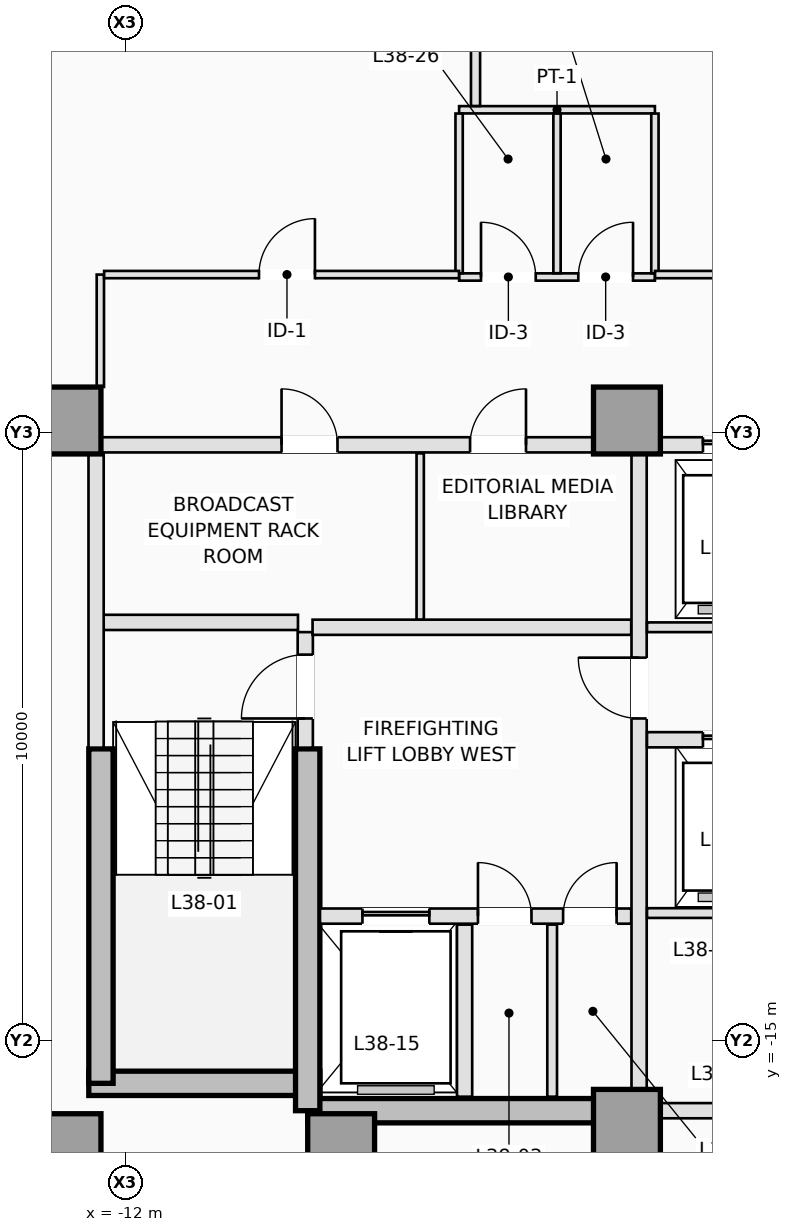
"""IFC4 building model, lengths in metres.
Left out: names, types, materials, properties, quantities, classifications, styles, units other than length and angle.
Written with IfcOpenShell. Run it as: python <this file> out.ifc"""

import sys

from ifc_helpers import new_model, si_unit, direction, frame, frame_2d, origin, origin_2d, place, context, subcontext, project, spatial, rectangle, extrude, element, fill, save


model = new_model("IFC4")
c1 = context("Model", 3, precision=1e-05, world=origin(), true_north=direction((0.0, 1.0)))
c2 = subcontext(c1, "Body", "Model", "MODEL_VIEW")
j1 = project(units=[si_unit("LENGTHUNIT", "METRE"), si_unit("PLANEANGLEUNIT", "RADIAN")], contexts=[c1])
p1 = place(None, origin())
s1 = spatial("IfcSite", under=j1, at=p1, CompositionType="ELEMENT")
p2 = place(p1, origin())
s2 = spatial("IfcBuilding", under=s1, at=p2, CompositionType="ELEMENT")
p3 = place(p2, frame((0.0, 0.0, 140.5)))
s3 = spatial("IfcBuildingStorey", under=s2, at=p3, CompositionType="ELEMENT", Elevation=140.5)
p4 = place(p3, frame((-12.6, -15.7, 0.0), z_axis=(0.0, 0.0, 1.0), x_axis=(1.0, 0.0, 0.0)))
e1 = element("IfcWall", 1, at=p4, inside=s3, PredefinedType="SHEAR", context=c2, shape_type="SweptSolid", body=[
    extrude(rectangle(XDim=3.8, YDim=0.4, at=frame_2d((1.9, 0.0))), origin(), (0.0, 0.0, 1.0), 3.5),
])
p5 = place(p3, frame((-9.0, -16.15, 0.0), z_axis=(0.0, 0.0, 1.0), x_axis=(1.0, 0.0, 0.0)))
e2 = element("IfcWall", 2, at=p5, inside=s3, PredefinedType="SHEAR", context=c2, shape_type="SweptSolid", body=[
    extrude(rectangle(XDim=5.25, YDim=0.4, at=frame_2d((2.625, 0.0))), origin(), (0.0, 0.0, 1.0), 3.5),
])
p6 = place(p3, frame((-12.4, -15.7, 0.0), z_axis=(0.0, 0.0, 1.0), x_axis=(0.0, 1.0, 0.0)))
e3 = element("IfcWall", 3, at=p6, inside=s3, PredefinedType="SHEAR", context=c2, shape_type="SweptSolid", body=[
    extrude(rectangle(XDim=5.5, YDim=0.4, at=frame_2d((2.75, 0.0))), origin(), (0.0, 0.0, 1.0), 3.5),
])
p7 = place(p3, frame((-9.0, -16.15, 0.0), z_axis=(0.0, 0.0, 1.0), x_axis=(0.0, 1.0, 0.0)))
e4 = element("IfcWall", 4, at=p7, inside=s3, PredefinedType="SHEAR", context=c2, shape_type="SweptSolid", body=[
    extrude(rectangle(XDim=5.95, YDim=0.4, at=frame_2d((2.975, 0.0))), origin(), (0.0, 0.0, 1.0), 3.5),
])
for number, where, z_axis, x_axis in (
    (5, (-12.95, -16.75, 0.0), (0.0, 0.0, 1.0), (1.0, 0.0, 0.0)),
    (6, (-8.45, -16.75, 0.0), (0.0, 0.0, 1.0), (1.0, 0.0, 0.0)),
    (7, (-3.75, -16.35, 0.0), (0.0, 0.0, 1.0), (1.0, 0.0, 0.0)),
    (8, (-12.95, -4.8, 0.0), (0.0, 0.0, 1.0), (1.0, 0.0, 0.0)),
    (9, (-3.75, -4.8, 0.0), (0.0, 0.0, 1.0), (1.0, 0.0, 0.0)),
):
    element("IfcColumn", number, at=place(p3, frame(where, z_axis=z_axis, x_axis=x_axis)), inside=s3, PredefinedType="COLUMN", context=c2, shape_type="SweptSolid", body=[
        extrude(rectangle(XDim=1.1, YDim=1.1, at=origin_2d()), origin(), (0.0, 0.0, 1.0), 3.5),
    ])
p8 = place(p3, frame((-15.383, -0.305, 0.0), z_axis=(0.0, 0.0, 1.0), x_axis=(0.490232095789, 0.871591929895, 0.0)))
e10 = element("IfcWall", 10, at=p8, inside=s3, PredefinedType="STANDARD", context=c2, shape_type="SweptSolid", body=[
    extrude(rectangle(XDim=4.375, YDim=0.28, at=frame_2d((2.188, 0.0))), origin(), (0.0, 0.0, 1.0), 3.25),
])
p9 = place(p3, frame((-9.04, -10.18, 0.0), z_axis=(0.0, 0.0, 1.0), x_axis=(0.0, 1.0, 0.0)))
e11 = element("IfcWall", 11, at=p9, inside=s3, PredefinedType="PARTITIONING", context=c2, shape_type="SweptSolid", body=[
    extrude(rectangle(XDim=1.9, YDim=0.25, at=frame_2d((0.95, 0.0))), origin(), (0.0, 0.0, 1.0), 3.25),
])
p10 = place(p9, frame((0.48, 0.0, 0.0)))
e12 = element("IfcOpeningElement", 12, at=p10, cuts=e11, PredefinedType="OPENING", context=c2, shape_type="SweptSolid", body=[
    extrude(rectangle(XDim=1.05, YDim=2.15, at=frame_2d((0.525, 1.075))), frame((0.0, 0.135, 0.0), z_axis=(0.0, -1.0, 0.0), x_axis=(1.0, 0.0, 0.0)), (0.0, 0.0, 1.0), 0.27),
])
p11 = place(p3, frame((-12.38, -8.12, 0.0), z_axis=(0.0, 0.0, 1.0), x_axis=(1.0, 0.0, 0.0)))
e13 = element("IfcWall", 13, at=p11, inside=s3, PredefinedType="PARTITIONING", context=c2, shape_type="SweptSolid", body=[
    extrude(rectangle(XDim=3.22, YDim=0.25, at=frame_2d((1.61, 0.0))), origin(), (0.0, 0.0, 1.0), 3.25),
])
p12 = place(p3, frame((-12.48, -10.18, 0.0), z_axis=(0.0, 0.0, 1.0), x_axis=(0.0, 1.0, 0.0)))
e14 = element("IfcWall", 14, at=p12, inside=s3, PredefinedType="PARTITIONING", context=c2, shape_type="SweptSolid", body=[
    extrude(rectangle(XDim=4.828, YDim=0.25, at=frame_2d((2.414, 0.0))), origin(), (0.0, 0.0, 1.0), 3.25),
])
p13 = place(p3, frame((-8.798, -12.95, 0.0), z_axis=(0.0, 0.0, 1.0), x_axis=(1.0, 0.0, 0.0)))
e15 = element("IfcWall", 15, at=p13, inside=s3, PredefinedType="PARTITIONING", context=c2, shape_type="SweptSolid", body=[
    extrude(rectangle(XDim=5.118, YDim=0.25, at=frame_2d((2.559, 0.0))), origin(), (0.0, 0.0, 1.0), 3.25),
])
p14 = place(p13, frame((0.698, 0.0, 0.0)))
e16 = element("IfcOpeningElement", 16, at=p14, cuts=e15, PredefinedType="OPENING", context=c2, shape_type="SweptSolid", body=[
    extrude(rectangle(XDim=1.1, YDim=2.15, at=frame_2d((0.55, 1.075))), frame((0.0, 0.135, 0.0), z_axis=(0.0, -1.0, 0.0), x_axis=(1.0, 0.0, 0.0)), (0.0, 0.0, 1.0), 0.27),
])
p15 = place(p13, frame((2.598, 0.0, 0.0)))
e17 = element("IfcOpeningElement", 17, at=p15, cuts=e15, PredefinedType="OPENING", context=c2, shape_type="SweptSolid", body=[
    extrude(rectangle(XDim=0.88, YDim=2.1, at=frame_2d((0.44, 1.05))), frame((0.0, 0.135, 0.0), z_axis=(0.0, -1.0, 0.0), x_axis=(1.0, 0.0, 0.0)), (0.0, 0.0, 1.0), 0.27),
])
p16 = place(p13, frame((3.998, 0.0, 0.0)))
e18 = element("IfcOpeningElement", 18, at=p16, cuts=e15, PredefinedType="OPENING", context=c2, shape_type="SweptSolid", body=[
    extrude(rectangle(XDim=0.88, YDim=2.1, at=frame_2d((0.44, 1.05))), frame((0.0, 0.135, 0.0), z_axis=(0.0, -1.0, 0.0), x_axis=(1.0, 0.0, 0.0)), (0.0, 0.0, 1.0), 0.27),
])
p17 = place(p3, frame((-6.42, -15.92, 0.0), z_axis=(0.0, 0.0, 1.0), x_axis=(0.0, 1.0, 0.0)))
e19 = element("IfcWall", 19, at=p17, inside=s3, PredefinedType="PARTITIONING", context=c2, shape_type="SweptSolid", body=[
    extrude(rectangle(XDim=2.83, YDim=0.25, at=frame_2d((1.415, 0.0))), origin(), (0.0, 0.0, 1.0), 3.25),
])
p18 = place(p3, frame((-4.98, -15.92, 0.0), z_axis=(0.0, 0.0, 1.0), x_axis=(0.0, 1.0, 0.0)))
e20 = element("IfcWall", 20, at=p18, inside=s3, PredefinedType="PARTITIONING", context=c2, shape_type="SweptSolid", body=[
    extrude(rectangle(XDim=2.83, YDim=0.16, at=frame_2d((1.415, 0.0))), origin(), (0.0, 0.0, 1.0), 3.25),
])
p19 = place(p3, frame((-8.92, -8.2, 0.0), z_axis=(0.0, 0.0, 1.0), x_axis=(1.0, 0.0, 0.0)))
e21 = element("IfcWall", 21, at=p19, inside=s3, PredefinedType="PARTITIONING", context=c2, shape_type="SweptSolid", body=[
    extrude(rectangle(XDim=5.24, YDim=0.25, at=frame_2d((2.62, 0.0))), origin(), (0.0, 0.0, 1.0), 3.25),
])
p20 = place(p3, frame((-3.55, -15.798, 0.0), z_axis=(0.0, 0.0, 1.0), x_axis=(0.0, 1.0, 0.0)))
e22 = element("IfcWall", 22, at=p20, inside=s3, PredefinedType="PARTITIONING", context=c2, shape_type="SweptSolid", body=[
    extrude(rectangle(XDim=10.446, YDim=0.25, at=frame_2d((5.223, 0.0))), origin(), (0.0, 0.0, 1.0), 3.25),
])
p21 = place(p20, frame((6.098, 0.0, 0.0)))
e23 = element("IfcOpeningElement", 23, at=p21, cuts=e22, PredefinedType="OPENING", context=c2, shape_type="SweptSolid", body=[
    extrude(rectangle(XDim=1.0, YDim=2.15, at=frame_2d((0.5, 1.075))), frame((0.0, 0.135, 0.0), z_axis=(0.0, -1.0, 0.0), x_axis=(1.0, 0.0, 0.0)), (0.0, 0.0, 1.0), 0.27),
])
p22 = place(p3, frame((-12.398, -5.2, 0.0), z_axis=(0.0, 0.0, 1.0), x_axis=(1.0, 0.0, 0.0)))
e24 = element("IfcWall", 24, at=p22, inside=s3, PredefinedType="PARTITIONING", context=c2, shape_type="SweptSolid", body=[
    extrude(rectangle(XDim=8.096, YDim=0.25, at=frame_2d((4.048, 0.0))), origin(), (0.0, 0.0, 1.0), 3.25),
])
p23 = place(p22, frame((2.968, 0.0, 0.0)))
e25 = element("IfcOpeningElement", 25, at=p23, cuts=e24, PredefinedType="OPENING", context=c2, shape_type="SweptSolid", body=[
    extrude(rectangle(XDim=0.92, YDim=2.12, at=frame_2d((0.46, 1.06))), frame((0.0, 0.135, 0.0), z_axis=(0.0, -1.0, 0.0), x_axis=(1.0, 0.0, 0.0)), (0.0, 0.0, 1.0), 0.27),
])
p24 = place(p22, frame((6.068, 0.0, 0.0)))
e26 = element("IfcOpeningElement", 26, at=p24, cuts=e24, PredefinedType="OPENING", context=c2, shape_type="SweptSolid", body=[
    extrude(rectangle(XDim=0.92, YDim=2.12, at=frame_2d((0.46, 1.06))), frame((0.0, 0.135, 0.0), z_axis=(0.0, -1.0, 0.0), x_axis=(1.0, 0.0, 0.0)), (0.0, 0.0, 1.0), 0.27),
])
p25 = place(p3, frame((-3.198, -5.2, 0.0), z_axis=(0.0, 0.0, 1.0), x_axis=(1.0, 0.0, 0.0)))
e27 = element("IfcWall", 27, at=p25, inside=s3, PredefinedType="PARTITIONING", context=c2, shape_type="SweptSolid", body=[
    extrude(rectangle(XDim=2.248, YDim=0.25, at=frame_2d((1.124, 0.0))), origin(), (0.0, 0.0, 1.0), 3.25),
])
p26 = place(p25, frame((0.698, 0.0, 0.0)))
e28 = element("IfcOpeningElement", 28, at=p26, cuts=e27, PredefinedType="OPENING", context=c2, shape_type="SweptSolid", body=[
    extrude(rectangle(XDim=1.0, YDim=2.15, at=frame_2d((0.5, 1.075))), frame((0.0, 0.135, 0.0), z_axis=(0.0, -1.0, 0.0), x_axis=(1.0, 0.0, 0.0)), (0.0, 0.0, 1.0), 0.27),
])
p27 = place(p3, frame((-7.15, -8.073, 0.0), z_axis=(0.0, 0.0, 1.0), x_axis=(0.0, 1.0, 0.0)))
e29 = element("IfcWall", 29, at=p27, inside=s3, PredefinedType="PARTITIONING", context=c2, shape_type="SweptSolid", body=[
    extrude(rectangle(XDim=2.733, YDim=0.12, at=frame_2d((1.366, 0.0))), origin(), (0.0, 0.0, 1.0), 3.25),
])
p28 = place(p3, frame((-3.198, -16.15, 0.0), z_axis=(0.0, 0.0, 1.0), x_axis=(1.0, 0.0, 0.0)))
e30 = element("IfcWall", 30, at=p28, inside=s3, PredefinedType="PARTITIONING", context=c2, shape_type="SweptSolid", body=[
    extrude(rectangle(XDim=6.396, YDim=0.25, at=frame_2d((3.198, 0.0))), origin(), (0.0, 0.0, 1.0), 2.45),
])
p29 = place(p3, frame((-3.42, -8.2, 0.0), z_axis=(0.0, 0.0, 1.0), x_axis=(1.0, 0.0, 0.0)))
e31 = element("IfcWall", 31, at=p29, inside=s3, PredefinedType="PARTITIONING", context=c2, shape_type="SweptSolid", body=[
    extrude(rectangle(XDim=2.47, YDim=0.16, at=frame_2d((1.235, 0.0))), origin(), (0.0, 0.0, 1.0), 3.25),
])
p30 = place(p3, frame((-3.42, -10.05, 0.0), z_axis=(0.0, 0.0, 1.0), x_axis=(1.0, 0.0, 0.0)))
e32 = element("IfcWall", 32, at=p30, inside=s3, PredefinedType="PARTITIONING", context=c2, shape_type="SweptSolid", body=[
    extrude(rectangle(XDim=2.47, YDim=0.25, at=frame_2d((1.235, 0.0))), origin(), (0.0, 0.0, 1.0), 3.25),
])
p31 = place(p30, frame((0.92, 0.0, 0.0)))
e33 = element("IfcOpeningElement", 33, at=p31, cuts=e32, PredefinedType="OPENING", context=c2, shape_type="SweptSolid", body=[
    extrude(rectangle(XDim=1.0, YDim=2.15, at=frame_2d((0.5, 1.075))), frame((0.0, 0.135, 0.0), z_axis=(0.0, -1.0, 0.0), x_axis=(1.0, 0.0, 0.0)), (0.0, 0.0, 1.0), 0.27),
])
p32 = place(p3, frame((-3.42, -12.9, 0.0), z_axis=(0.0, 0.0, 1.0), x_axis=(1.0, 0.0, 0.0)))
e34 = element("IfcWall", 34, at=p32, inside=s3, PredefinedType="PARTITIONING", context=c2, shape_type="SweptSolid", body=[
    extrude(rectangle(XDim=6.84, YDim=0.16, at=frame_2d((3.42, 0.0))), origin(), (0.0, 0.0, 1.0), 3.25),
])
p33 = place(p32, frame((2.98, 0.0, 0.0)))
e35 = element("IfcOpeningElement", 35, at=p33, cuts=e34, PredefinedType="OPENING", context=c2, shape_type="SweptSolid", body=[
    extrude(rectangle(XDim=0.88, YDim=2.12, at=frame_2d((0.44, 1.06))), frame((0.0, 0.09, 0.0), z_axis=(0.0, -1.0, 0.0), x_axis=(1.0, 0.0, 0.0)), (0.0, 0.0, 1.0), 0.18),
])
p34 = place(p3, frame((-6.51, -2.44, 0.0), z_axis=(0.0, 0.0, 1.0), x_axis=(1.0, 0.0, 0.0)))
e36 = element("IfcWall", 36, at=p34, inside=s3, PredefinedType="PARTITIONING", context=c2, shape_type="SweptSolid", body=[
    extrude(rectangle(XDim=3.22, YDim=0.12, at=frame_2d((1.61, 0.0))), origin(), (0.0, 0.0, 1.0), 2.891),
])
p35 = place(p34, frame((0.36, 0.0, 0.0)))
e37 = element("IfcOpeningElement", 37, at=p35, cuts=e36, PredefinedType="OPENING", context=c2, shape_type="SweptSolid", body=[
    extrude(rectangle(XDim=0.9, YDim=2.12, at=frame_2d((0.45, 1.06))), frame((0.0, 0.07, 0.0), z_axis=(0.0, -1.0, 0.0), x_axis=(1.0, 0.0, 0.0)), (0.0, 0.0, 1.0), 0.14),
])
p36 = place(p34, frame((1.96, 0.0, 0.0)))
e38 = element("IfcOpeningElement", 38, at=p36, cuts=e36, PredefinedType="OPENING", context=c2, shape_type="SweptSolid", body=[
    extrude(rectangle(XDim=0.9, YDim=2.12, at=frame_2d((0.45, 1.06))), frame((0.0, 0.07, 0.0), z_axis=(0.0, -1.0, 0.0), x_axis=(1.0, 0.0, 0.0)), (0.0, 0.0, 1.0), 0.14),
])
p37 = place(p3, frame((-6.51, 0.31, 0.0), z_axis=(0.0, 0.0, 1.0), x_axis=(1.0, 0.0, 0.0)))
e39 = element("IfcWall", 39, at=p37, inside=s3, PredefinedType="PARTITIONING", context=c2, shape_type="SweptSolid", body=[
    extrude(rectangle(XDim=3.22, YDim=0.12, at=frame_2d((1.61, 0.0))), origin(), (0.0, 0.0, 1.0), 3.25),
])
for number, where, z_axis, x_axis in (
    (40, (-6.51, -2.378, 0.0), (0.0, 0.0, 1.0), (0.0, 1.0, 0.0)),
    (41, (-4.9, -2.378, 0.0), (0.0, 0.0, 1.0), (0.0, 1.0, 0.0)),
    (42, (-3.29, -2.378, 0.0), (0.0, 0.0, 1.0), (0.0, 1.0, 0.0)),
):
    element("IfcWall", number, at=place(p3, frame(where, z_axis=z_axis, x_axis=x_axis)), inside=s3, PredefinedType="PARTITIONING", context=c2, shape_type="SweptSolid", body=[
        extrude(rectangle(XDim=2.626, YDim=0.12, at=frame_2d((1.313, 0.0))), origin(), (0.0, 0.0, 1.0), 3.25),
    ])
p38 = place(p3, frame((-12.41, -4.248, 0.0), z_axis=(0.0, 0.0, 1.0), x_axis=(0.0, 1.0, 0.0)))
e43 = element("IfcWall", 43, at=p38, inside=s3, PredefinedType="PARTITIONING", context=c2, shape_type="SweptSolid", body=[
    extrude(rectangle(XDim=1.848, YDim=0.12, at=frame_2d((0.924, 0.0))), origin(), (0.0, 0.0, 1.0), 3.25),
])
p39 = place(p3, frame((-12.348, -2.4, 0.0), z_axis=(0.0, 0.0, 1.0), x_axis=(1.0, 0.0, 0.0)))
e44 = element("IfcWall", 44, at=p39, inside=s3, PredefinedType="PARTITIONING", context=c2, shape_type="SweptSolid", body=[
    extrude(rectangle(XDim=5.836, YDim=0.12, at=frame_2d((2.918, 0.0))), origin(), (0.0, 0.0, 1.0), 3.25),
])
p40 = place(p39, frame((2.547, 0.0, 0.0)))
e45 = element("IfcOpeningElement", 45, at=p40, cuts=e44, PredefinedType="OPENING", context=c2, shape_type="SweptSolid", body=[
    extrude(rectangle(XDim=0.92, YDim=2.12, at=frame_2d((0.46, 1.06))), frame((0.0, 0.07, 0.0), z_axis=(0.0, -1.0, 0.0), x_axis=(1.0, 0.0, 0.0)), (0.0, 0.0, 1.0), 0.14),
])
p41 = place(p3, frame((-3.288, -2.4, 0.0), z_axis=(0.0, 0.0, 1.0), x_axis=(1.0, 0.0, 0.0)))
e46 = element("IfcWall", 46, at=p41, inside=s3, PredefinedType="PARTITIONING", context=c2, shape_type="SweptSolid", body=[
    extrude(rectangle(XDim=2.218, YDim=0.12, at=frame_2d((1.109, 0.0))), origin(), (0.0, 0.0, 1.0), 2.891),
])
p42 = place(p3, frame((-6.24, 0.372, 0.0), z_axis=(0.0, 0.0, 1.0), x_axis=(0.0, 1.0, 0.0)))
e47 = element("IfcWall", 47, at=p42, inside=s3, PredefinedType="PARTITIONING", context=c2, shape_type="SweptSolid", body=[
    extrude(rectangle(XDim=1.795, YDim=0.15, at=frame_2d((0.898, 0.0))), origin(), (0.0, 0.0, 1.0), 3.25),
])
p43 = place(p26, origin())
e48 = element("IfcDoor", 48, at=p43, inside=s3, OperationType="SLIDING_TO_LEFT", PredefinedType="DOOR", context=c2, shape_type="SweptSolid", body=[
    extrude(rectangle(XDim=1.0, YDim=2.15, at=frame_2d((0.5, 1.075))), frame((0.0, 0.025, 0.0), z_axis=(0.0, -1.0, 0.0), x_axis=(1.0, 0.0, 0.0)), (0.0, 0.0, 1.0), 0.05),
])
fill(e28, e48)
p44 = place(p14, origin())
e49 = element("IfcDoor", 49, at=p44, inside=s3, OperationType="SLIDING_TO_LEFT", PredefinedType="DOOR", context=c2, shape_type="SweptSolid", body=[
    extrude(rectangle(XDim=1.1, YDim=2.15, at=frame_2d((0.55, 1.075))), frame((0.0, 0.025, 0.0), z_axis=(0.0, -1.0, 0.0), x_axis=(1.0, 0.0, 0.0)), (0.0, 0.0, 1.0), 0.05),
])
fill(e16, e49)
p45 = place(p31, origin())
e50 = element("IfcDoor", 50, at=p45, inside=s3, OperationType="SLIDING_TO_LEFT", PredefinedType="DOOR", context=c2, shape_type="SweptSolid", body=[
    extrude(rectangle(XDim=1.0, YDim=2.15, at=frame_2d((0.5, 1.075))), frame((0.0, 0.025, 0.0), z_axis=(0.0, -1.0, 0.0), x_axis=(1.0, 0.0, 0.0)), (0.0, 0.0, 1.0), 0.05),
])
fill(e33, e50)
p46 = place(p10, origin())
e51 = element("IfcDoor", 51, at=p46, inside=s3, OperationType="SINGLE_SWING_LEFT", PredefinedType="DOOR", context=c2, shape_type="SweptSolid", body=[
    extrude(rectangle(XDim=1.05, YDim=2.15, at=frame_2d((0.525, 1.075))), frame((0.0, 0.025, 0.0), z_axis=(0.0, -1.0, 0.0), x_axis=(1.0, 0.0, 0.0)), (0.0, 0.0, 1.0), 0.05),
])
fill(e12, e51)
p47 = place(p15, origin())
e52 = element("IfcDoor", 52, at=p47, inside=s3, OperationType="SINGLE_SWING_LEFT", PredefinedType="TRAPDOOR", context=c2, shape_type="SweptSolid", body=[
    extrude(rectangle(XDim=0.88, YDim=2.1, at=frame_2d((0.44, 1.05))), frame((0.0, 0.025, 0.0), z_axis=(0.0, -1.0, 0.0), x_axis=(1.0, 0.0, 0.0)), (0.0, 0.0, 1.0), 0.05),
])
fill(e17, e52)
p48 = place(p16, origin())
e53 = element("IfcDoor", 53, at=p48, inside=s3, OperationType="SINGLE_SWING_RIGHT", PredefinedType="TRAPDOOR", context=c2, shape_type="SweptSolid", body=[
    extrude(rectangle(XDim=0.88, YDim=2.1, at=frame_2d((0.44, 1.05))), frame((0.0, 0.025, 0.0), z_axis=(0.0, -1.0, 0.0), x_axis=(1.0, 0.0, 0.0)), (0.0, 0.0, 1.0), 0.05),
])
fill(e18, e53)
p49 = place(p21, origin())
e54 = element("IfcDoor", 54, at=p49, inside=s3, OperationType="SINGLE_SWING_RIGHT", PredefinedType="DOOR", context=c2, shape_type="SweptSolid", body=[
    extrude(rectangle(XDim=1.0, YDim=2.15, at=frame_2d((0.5, 1.075))), frame((0.0, 0.025, 0.0), z_axis=(0.0, -1.0, 0.0), x_axis=(1.0, 0.0, 0.0)), (0.0, 0.0, 1.0), 0.05),
])
fill(e23, e54)
p50 = place(p23, origin())
e55 = element("IfcDoor", 55, at=p50, inside=s3, OperationType="SINGLE_SWING_LEFT", PredefinedType="DOOR", context=c2, shape_type="SweptSolid", body=[
    extrude(rectangle(XDim=0.92, YDim=2.12, at=frame_2d((0.46, 1.06))), frame((0.0, 0.025, 0.0), z_axis=(0.0, -1.0, 0.0), x_axis=(1.0, 0.0, 0.0)), (0.0, 0.0, 1.0), 0.05),
])
fill(e25, e55)
p51 = place(p24, origin())
e56 = element("IfcDoor", 56, at=p51, inside=s3, OperationType="SINGLE_SWING_RIGHT", PredefinedType="DOOR", context=c2, shape_type="SweptSolid", body=[
    extrude(rectangle(XDim=0.92, YDim=2.12, at=frame_2d((0.46, 1.06))), frame((0.0, 0.025, 0.0), z_axis=(0.0, -1.0, 0.0), x_axis=(1.0, 0.0, 0.0)), (0.0, 0.0, 1.0), 0.05),
])
fill(e26, e56)
p52 = place(p35, origin())
e57 = element("IfcDoor", 57, at=p52, inside=s3, OperationType="SINGLE_SWING_LEFT", PredefinedType="DOOR", context=c2, shape_type="SweptSolid", body=[
    extrude(rectangle(XDim=0.9, YDim=2.12, at=frame_2d((0.45, 1.06))), frame((0.0, 0.025, 0.0), z_axis=(0.0, -1.0, 0.0), x_axis=(1.0, 0.0, 0.0)), (0.0, 0.0, 1.0), 0.05),
])
fill(e37, e57)
p53 = place(p36, origin())
e58 = element("IfcDoor", 58, at=p53, inside=s3, OperationType="SINGLE_SWING_RIGHT", PredefinedType="DOOR", context=c2, shape_type="SweptSolid", body=[
    extrude(rectangle(XDim=0.9, YDim=2.12, at=frame_2d((0.45, 1.06))), frame((0.0, 0.025, 0.0), z_axis=(0.0, -1.0, 0.0), x_axis=(1.0, 0.0, 0.0)), (0.0, 0.0, 1.0), 0.05),
])
fill(e38, e58)
p54 = place(p40, origin())
e59 = element("IfcDoor", 59, at=p54, inside=s3, OperationType="SINGLE_SWING_RIGHT", PredefinedType="DOOR", context=c2, shape_type="SweptSolid", body=[
    extrude(rectangle(XDim=0.92, YDim=2.12, at=frame_2d((0.46, 1.06))), frame((0.0, 0.025, 0.0), z_axis=(0.0, -1.0, 0.0), x_axis=(1.0, 0.0, 0.0)), (0.0, 0.0, 1.0), 0.05),
])
fill(e45, e59)
save(model, sys.argv[1])
